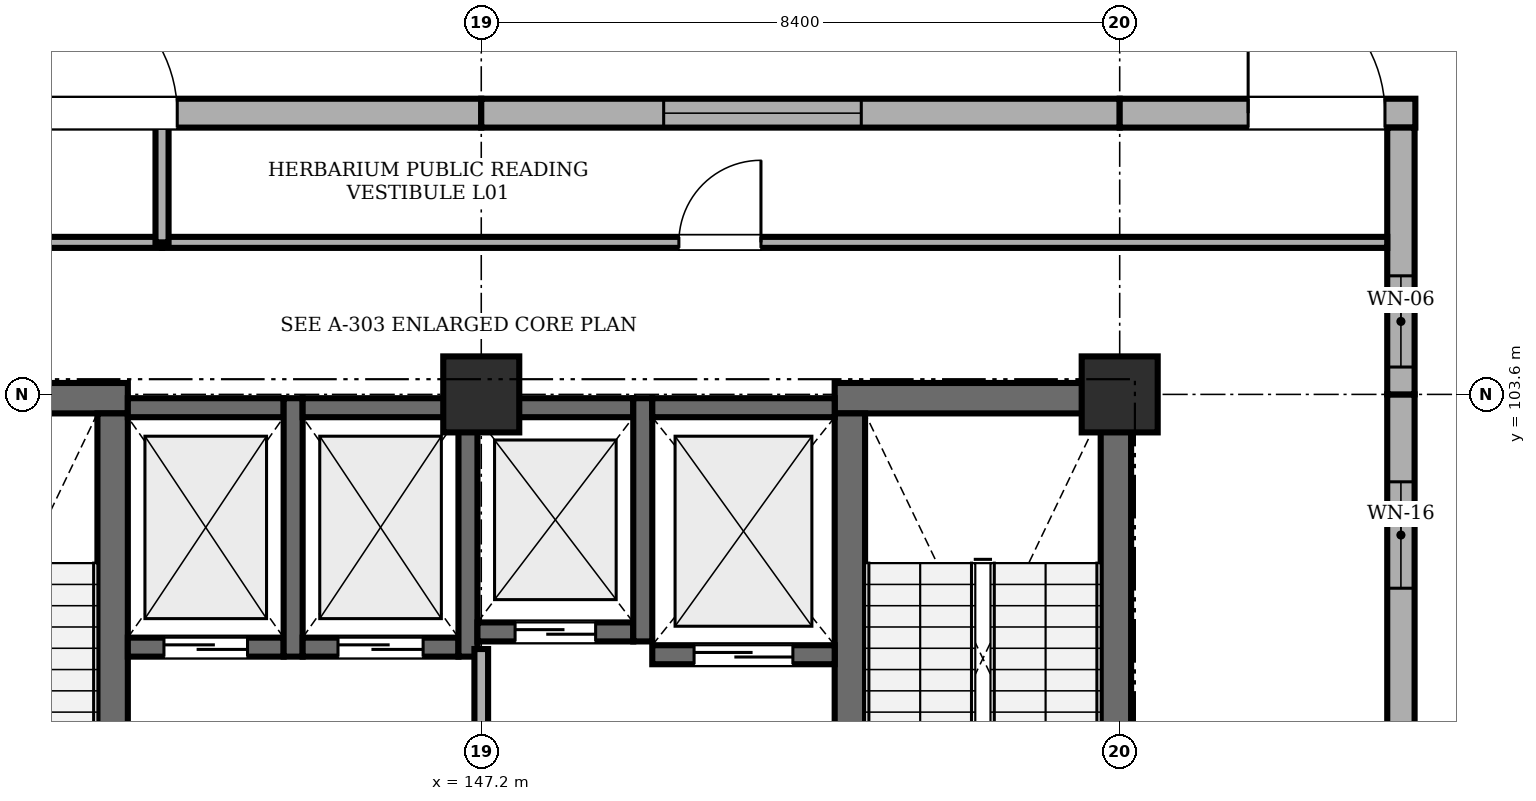
"""IFC4 building model, lengths in metres.
Left out: names, types, materials, properties, quantities, classifications, styles, units other than length and angle.
Written with IfcOpenShell. Run it as: python <this file> out.ifc"""

import sys

from ifc_helpers import new_model, si_unit, direction, frame, frame_2d, origin, origin_2d, place, context, subcontext, project, spatial, rectangle, extrude, element, fill, save


model = new_model("IFC4")
c1 = context("Model", 3, precision=1e-05, world=origin(), true_north=direction((0.0, 1.0)))
c2 = subcontext(c1, "Body", "Model", "MODEL_VIEW")
j1 = project(units=[si_unit("LENGTHUNIT", "METRE"), si_unit("PLANEANGLEUNIT", "RADIAN")], contexts=[c1])
p1 = place(None, origin())
s1 = spatial("IfcSite", under=j1, at=p1, CompositionType="ELEMENT")
p2 = place(p1, origin())
s2 = spatial("IfcBuilding", under=s1, at=p2, CompositionType="ELEMENT")
p3 = place(p2, origin())
s3 = spatial("IfcBuildingStorey", under=s2, at=p3, CompositionType="ELEMENT", Elevation=0.0)
for number, where, z_axis, x_axis in (
    (1, (147.2, 103.6, 0.0), (0.0, 0.0, 1.0), (1.0, 0.0, 0.0)),
    (2, (155.6, 103.6, 0.0), (0.0, 0.0, 1.0), (1.0, 0.0, 0.0)),
):
    element("IfcColumn", number, at=place(p3, frame(where, z_axis=z_axis, x_axis=x_axis)), inside=s3, PredefinedType="COLUMN", context=c2, shape_type="SweptSolid", body=[
        extrude(rectangle(XDim=1.0, YDim=1.0, at=origin_2d()), origin(), (0.0, 0.0, 1.0), 5.18),
    ])
p4 = place(p3, frame((138.65, 103.55, 0.0), z_axis=(0.0, 0.0, 1.0), x_axis=(1.0, 0.0, 0.0)))
e3 = element("IfcWall", 3, at=p4, inside=s3, PredefinedType="SHEAR", context=c2, shape_type="SweptSolid", body=[
    extrude(rectangle(XDim=3.9, YDim=0.4, at=frame_2d((1.95, 0.0))), origin(), (0.0, 0.0, 1.0), 5.18),
])
p5 = place(p3, frame((142.35, 95.45, 0.0), z_axis=(0.0, 0.0, 1.0), x_axis=(0.0, 1.0, 0.0)))
e4 = element("IfcWall", 4, at=p5, inside=s3, PredefinedType="SHEAR", context=c2, shape_type="SweptSolid", body=[
    extrude(rectangle(XDim=7.9, YDim=0.4, at=frame_2d((3.95, 0.0))), origin(), (0.0, 0.0, 1.0), 5.18),
])
p6 = place(p5, frame((0.22, 0.0, 0.0)))
e5 = element("IfcOpeningElement", 5, at=p6, cuts=e4, PredefinedType="OPENING", context=c2, shape_type="SweptSolid", body=[
    extrude(rectangle(XDim=1.15, YDim=2.15, at=frame_2d((0.575, 1.075))), frame((0.0, 0.21, 0.0), z_axis=(0.0, -1.0, 0.0), x_axis=(1.0, 0.0, 0.0)), (0.0, 0.0, 1.0), 0.42),
])
p7 = place(p3, frame((151.85, 103.55, 0.0), z_axis=(0.0, 0.0, 1.0), x_axis=(1.0, 0.0, 0.0)))
e6 = element("IfcWall", 6, at=p7, inside=s3, PredefinedType="SHEAR", context=c2, shape_type="SweptSolid", body=[
    extrude(rectangle(XDim=3.9, YDim=0.4, at=frame_2d((1.95, 0.0))), origin(), (0.0, 0.0, 1.0), 5.18),
])
p8 = place(p3, frame((152.05, 95.45, 0.0), z_axis=(0.0, 0.0, 1.0), x_axis=(0.0, 1.0, 0.0)))
e7 = element("IfcWall", 7, at=p8, inside=s3, PredefinedType="SHEAR", context=c2, shape_type="SweptSolid", body=[
    extrude(rectangle(XDim=7.9, YDim=0.4, at=frame_2d((3.95, 0.0))), origin(), (0.0, 0.0, 1.0), 5.18),
])
p9 = place(p8, frame((0.35, 0.0, 0.0)))
e8 = element("IfcOpeningElement", 8, at=p9, cuts=e7, PredefinedType="OPENING", context=c2, shape_type="SweptSolid", body=[
    extrude(rectangle(XDim=1.15, YDim=2.15, at=frame_2d((0.575, 1.075))), frame((0.0, 0.21, 0.0), z_axis=(0.0, -1.0, 0.0), x_axis=(1.0, 0.0, 0.0)), (0.0, 0.0, 1.0), 0.42),
])
p10 = place(p3, frame((155.55, 95.45, 0.0), z_axis=(0.0, 0.0, 1.0), x_axis=(0.0, 1.0, 0.0)))
e9 = element("IfcWall", 9, at=p10, inside=s3, PredefinedType="SHEAR", context=c2, shape_type="SweptSolid", body=[
    extrude(rectangle(XDim=7.9, YDim=0.4, at=frame_2d((3.95, 0.0))), origin(), (0.0, 0.0, 1.0), 5.18),
])
p11 = place(p3, frame((142.55, 100.275, 0.0), z_axis=(0.0, 0.0, 1.0), x_axis=(1.0, 0.0, 0.0)))
e10 = element("IfcWall", 10, at=p11, inside=s3, PredefinedType="SHEAR", context=c2, shape_type="SweptSolid", body=[
    extrude(rectangle(XDim=2.05, YDim=0.25, at=frame_2d((1.025, 0.0))), origin(), (0.0, 0.0, 1.0), 5.18),
])
p12 = place(p11, frame((0.475, 0.0, 0.0)))
e11 = element("IfcOpeningElement", 11, at=p12, cuts=e10, PredefinedType="OPENING", context=c2, shape_type="SweptSolid", body=[
    extrude(rectangle(XDim=1.1, YDim=2.15, at=frame_2d((0.55, 1.075))), frame((0.0, 0.135, 0.0), z_axis=(0.0, -1.0, 0.0), x_axis=(1.0, 0.0, 0.0)), (0.0, 0.0, 1.0), 0.27),
])
p13 = place(p3, frame((142.55, 103.425, 0.0), z_axis=(0.0, 0.0, 1.0), x_axis=(1.0, 0.0, 0.0)))
e12 = element("IfcWall", 12, at=p13, inside=s3, PredefinedType="SHEAR", context=c2, shape_type="SweptSolid", body=[
    extrude(rectangle(XDim=2.05, YDim=0.25, at=frame_2d((1.025, 0.0))), origin(), (0.0, 0.0, 1.0), 5.18),
])
p14 = place(p3, frame((144.725, 100.15, 0.0), z_axis=(0.0, 0.0, 1.0), x_axis=(0.0, 1.0, 0.0)))
e13 = element("IfcWall", 13, at=p14, inside=s3, PredefinedType="SHEAR", context=c2, shape_type="SweptSolid", body=[
    extrude(rectangle(XDim=3.4, YDim=0.25, at=frame_2d((1.7, 0.0))), origin(), (0.0, 0.0, 1.0), 5.18),
])
p15 = place(p3, frame((144.85, 100.275, 0.0), z_axis=(0.0, 0.0, 1.0), x_axis=(1.0, 0.0, 0.0)))
e14 = element("IfcWall", 14, at=p15, inside=s3, PredefinedType="SHEAR", context=c2, shape_type="SweptSolid", body=[
    extrude(rectangle(XDim=2.05, YDim=0.25, at=frame_2d((1.025, 0.0))), origin(), (0.0, 0.0, 1.0), 5.18),
])
p16 = place(p15, frame((0.465, 0.0, 0.0)))
e15 = element("IfcOpeningElement", 15, at=p16, cuts=e14, PredefinedType="OPENING", context=c2, shape_type="SweptSolid", body=[
    extrude(rectangle(XDim=1.12, YDim=2.15, at=frame_2d((0.56, 1.075))), frame((0.0, 0.135, 0.0), z_axis=(0.0, -1.0, 0.0), x_axis=(1.0, 0.0, 0.0)), (0.0, 0.0, 1.0), 0.27),
])
p17 = place(p3, frame((144.85, 103.425, 0.0), z_axis=(0.0, 0.0, 1.0), x_axis=(1.0, 0.0, 0.0)))
e16 = element("IfcWall", 16, at=p17, inside=s3, PredefinedType="SHEAR", context=c2, shape_type="SweptSolid", body=[
    extrude(rectangle(XDim=2.05, YDim=0.25, at=frame_2d((1.025, 0.0))), origin(), (0.0, 0.0, 1.0), 5.18),
])
p18 = place(p3, frame((147.025, 100.15, 0.0), z_axis=(0.0, 0.0, 1.0), x_axis=(0.0, 1.0, 0.0)))
e17 = element("IfcWall", 17, at=p18, inside=s3, PredefinedType="SHEAR", context=c2, shape_type="SweptSolid", body=[
    extrude(rectangle(XDim=3.4, YDim=0.25, at=frame_2d((1.7, 0.0))), origin(), (0.0, 0.0, 1.0), 5.18),
])
p19 = place(p3, frame((147.15, 100.475, 0.0), z_axis=(0.0, 0.0, 1.0), x_axis=(1.0, 0.0, 0.0)))
e18 = element("IfcWall", 18, at=p19, inside=s3, PredefinedType="SHEAR", context=c2, shape_type="SweptSolid", body=[
    extrude(rectangle(XDim=2.05, YDim=0.25, at=frame_2d((1.025, 0.0))), origin(), (0.0, 0.0, 1.0), 5.18),
])
p20 = place(p19, frame((0.495, 0.0, 0.0)))
e19 = element("IfcOpeningElement", 19, at=p20, cuts=e18, PredefinedType="OPENING", context=c2, shape_type="SweptSolid", body=[
    extrude(rectangle(XDim=1.06, YDim=2.15, at=frame_2d((0.53, 1.075))), frame((0.0, 0.135, 0.0), z_axis=(0.0, -1.0, 0.0), x_axis=(1.0, 0.0, 0.0)), (0.0, 0.0, 1.0), 0.27),
])
p21 = place(p3, frame((147.15, 103.425, 0.0), z_axis=(0.0, 0.0, 1.0), x_axis=(1.0, 0.0, 0.0)))
e20 = element("IfcWall", 20, at=p21, inside=s3, PredefinedType="SHEAR", context=c2, shape_type="SweptSolid", body=[
    extrude(rectangle(XDim=2.05, YDim=0.25, at=frame_2d((1.025, 0.0))), origin(), (0.0, 0.0, 1.0), 5.18),
])
p22 = place(p3, frame((149.325, 100.35, 0.0), z_axis=(0.0, 0.0, 1.0), x_axis=(0.0, 1.0, 0.0)))
e21 = element("IfcWall", 21, at=p22, inside=s3, PredefinedType="SHEAR", context=c2, shape_type="SweptSolid", body=[
    extrude(rectangle(XDim=3.2, YDim=0.25, at=frame_2d((1.6, 0.0))), origin(), (0.0, 0.0, 1.0), 5.18),
])
p23 = place(p3, frame((149.45, 100.175, 0.0), z_axis=(0.0, 0.0, 1.0), x_axis=(1.0, 0.0, 0.0)))
e22 = element("IfcWall", 22, at=p23, inside=s3, PredefinedType="SHEAR", context=c2, shape_type="SweptSolid", body=[
    extrude(rectangle(XDim=2.4, YDim=0.25, at=frame_2d((1.2, 0.0))), origin(), (0.0, 0.0, 1.0), 5.18),
])
p24 = place(p23, frame((0.55, 0.0, 0.0)))
e23 = element("IfcOpeningElement", 23, at=p24, cuts=e22, PredefinedType="OPENING", context=c2, shape_type="SweptSolid", body=[
    extrude(rectangle(XDim=1.3, YDim=2.25, at=frame_2d((0.65, 1.125))), frame((0.0, 0.135, 0.0), z_axis=(0.0, -1.0, 0.0), x_axis=(1.0, 0.0, 0.0)), (0.0, 0.0, 1.0), 0.27),
])
p25 = place(p3, frame((149.45, 103.425, 0.0), z_axis=(0.0, 0.0, 1.0), x_axis=(1.0, 0.0, 0.0)))
e24 = element("IfcWall", 24, at=p25, inside=s3, PredefinedType="SHEAR", context=c2, shape_type="SweptSolid", body=[
    extrude(rectangle(XDim=2.4, YDim=0.25, at=frame_2d((1.2, 0.0))), origin(), (0.0, 0.0, 1.0), 5.18),
])
p26 = place(p3, frame((138.8, 107.3, 0.0), z_axis=(0.0, 0.0, 1.0), x_axis=(1.0, 0.0, 0.0)))
e25 = element("IfcWall", 25, at=p26, inside=s3, PredefinedType="SOLIDWALL", context=c2, shape_type="SweptSolid", body=[
    extrude(rectangle(XDim=8.4, YDim=0.38, at=frame_2d((4.2, 0.0))), origin(), (0.0, 0.0, 1.0), 5.18),
])
p27 = place(p26, frame((2.6, 0.0, 0.0)))
e26 = element("IfcOpeningElement", 26, at=p27, cuts=e25, PredefinedType="OPENING", context=c2, shape_type="SweptSolid", body=[
    extrude(rectangle(XDim=1.8, YDim=2.3, at=frame_2d((0.9, 1.15))), frame((0.0, 0.2, 0.0), z_axis=(0.0, -1.0, 0.0), x_axis=(1.0, 0.0, 0.0)), (0.0, 0.0, 1.0), 0.4),
])
p28 = place(p3, frame((147.2, 107.3, 0.0), z_axis=(0.0, 0.0, 1.0), x_axis=(1.0, 0.0, 0.0)))
e27 = element("IfcWall", 27, at=p28, inside=s3, PredefinedType="SOLIDWALL", context=c2, shape_type="SweptSolid", body=[
    extrude(rectangle(XDim=8.4, YDim=0.38, at=frame_2d((4.2, 0.0))), origin(), (0.0, 0.0, 1.0), 5.18),
])
p29 = place(p28, frame((2.4, 0.0, 0.85)))
e28 = element("IfcOpeningElement", 28, at=p29, cuts=e27, PredefinedType="OPENING", context=c2, shape_type="SweptSolid", body=[
    extrude(rectangle(XDim=2.6, YDim=2.4, at=frame_2d((1.3, 1.2))), frame((0.0, 0.2, 0.0), z_axis=(0.0, -1.0, 0.0), x_axis=(1.0, 0.0, 0.0)), (0.0, 0.0, 1.0), 0.4),
])
p30 = place(p3, frame((155.6, 107.3, 0.0), z_axis=(0.0, 0.0, 1.0), x_axis=(1.0, 0.0, 0.0)))
e29 = element("IfcWall", 29, at=p30, inside=s3, PredefinedType="SOLIDWALL", context=c2, shape_type="SweptSolid", body=[
    extrude(rectangle(XDim=3.89, YDim=0.38, at=frame_2d((1.945, 0.0))), origin(), (0.0, 0.0, 1.0), 5.18),
])
p31 = place(p30, frame((1.69, 0.0, 0.0)))
e30 = element("IfcOpeningElement", 30, at=p31, cuts=e29, PredefinedType="OPENING", context=c2, shape_type="SweptSolid", body=[
    extrude(rectangle(XDim=1.8, YDim=2.3, at=frame_2d((0.9, 1.15))), frame((0.0, 0.2, 0.0), z_axis=(0.0, -1.0, 0.0), x_axis=(1.0, 0.0, 0.0)), (0.0, 0.0, 1.0), 0.4),
])
p32 = place(p3, frame((159.3, 103.6, 0.0), z_axis=(0.0, 0.0, 1.0), x_axis=(0.0, -1.0, 0.0)))
e31 = element("IfcWall", 31, at=p32, inside=s3, PredefinedType="STANDARD", context=c2, shape_type="SweptSolid", body=[
    extrude(rectangle(XDim=8.4, YDim=0.36, at=frame_2d((4.2, 0.0))), origin(), (0.0, 0.0, 1.0), 4.78),
])
p33 = place(p32, frame((1.15, 0.0, 1.1)))
e32 = element("IfcOpeningElement", 32, at=p33, cuts=e31, PredefinedType="OPENING", context=c2, shape_type="SweptSolid", body=[
    extrude(rectangle(XDim=1.4, YDim=1.4, at=frame_2d((0.7, 0.7))), frame((0.0, 0.19, 0.0), z_axis=(0.0, -1.0, 0.0), x_axis=(1.0, 0.0, 0.0)), (0.0, 0.0, 1.0), 0.38),
])
p34 = place(p3, frame((159.3, 107.11, 0.0), z_axis=(0.0, 0.0, 1.0), x_axis=(0.0, -1.0, 0.0)))
e33 = element("IfcWall", 33, at=p34, inside=s3, PredefinedType="STANDARD", context=c2, shape_type="SweptSolid", body=[
    extrude(rectangle(XDim=3.51, YDim=0.36, at=frame_2d((1.755, 0.0))), origin(), (0.0, 0.0, 1.0), 4.78),
])
p35 = place(p34, frame((1.95, 0.0, 1.1)))
e34 = element("IfcOpeningElement", 34, at=p35, cuts=e33, PredefinedType="OPENING", context=c2, shape_type="SweptSolid", body=[
    extrude(rectangle(XDim=1.2, YDim=1.8, at=frame_2d((0.6, 0.9))), frame((0.0, 0.19, 0.0), z_axis=(0.0, -1.0, 0.0), x_axis=(1.0, 0.0, 0.0)), (0.0, 0.0, 1.0), 0.38),
])
p36 = place(p3, frame((147.2, 95.75, 0.0), z_axis=(0.0, 0.0, 1.0), x_axis=(0.0, 1.0, 0.0)))
e35 = element("IfcWall", 35, at=p36, inside=s3, PredefinedType="STANDARD", context=c2, shape_type="SweptSolid", body=[
    extrude(rectangle(XDim=4.5, YDim=0.18, at=frame_2d((2.25, 0.0))), origin(), (0.0, 0.0, 1.0), 4.43),
])
p37 = place(p3, frame((122.15, 105.6, 0.0), z_axis=(0.0, 0.0, 1.0), x_axis=(1.0, 0.0, 0.0)))
e36 = element("IfcWall", 36, at=p37, inside=s3, PredefinedType="PARTITIONING", context=c2, shape_type="SweptSolid", body=[
    extrude(rectangle(XDim=20.85, YDim=0.145, at=frame_2d((10.425, 0.0))), origin(), (0.0, 0.0, 1.0), 5.18),
])
p38 = place(p37, frame((3.75, 0.0, 0.0)))
e37 = element("IfcOpeningElement", 37, at=p38, cuts=e36, PredefinedType="OPENING", context=c2, shape_type="SweptSolid", body=[
    extrude(rectangle(XDim=1.85, YDim=2.25, at=frame_2d((0.925, 1.125))), frame((0.0, 0.083, 0.0), z_axis=(0.0, -1.0, 0.0), x_axis=(1.0, 0.0, 0.0)), (0.0, 0.0, 1.0), 0.165),
])
p39 = place(p3, frame((143.0, 105.6, 0.0), z_axis=(0.0, 0.0, 1.0), x_axis=(1.0, 0.0, 0.0)))
e38 = element("IfcWall", 38, at=p39, inside=s3, PredefinedType="PARTITIONING", context=c2, shape_type="SweptSolid", body=[
    extrude(rectangle(XDim=16.12, YDim=0.145, at=frame_2d((8.06, 0.0))), origin(), (0.0, 0.0, 1.0), 5.18),
])
p40 = place(p39, frame((6.8, 0.0, 0.0)))
e39 = element("IfcOpeningElement", 39, at=p40, cuts=e38, PredefinedType="OPENING", context=c2, shape_type="SweptSolid", body=[
    extrude(rectangle(XDim=1.08, YDim=2.15, at=frame_2d((0.54, 1.075))), frame((0.0, 0.083, 0.0), z_axis=(0.0, -1.0, 0.0), x_axis=(1.0, 0.0, 0.0)), (0.0, 0.0, 1.0), 0.165),
])
p41 = place(p3, frame((143.0, 105.6, 0.0), z_axis=(0.0, 0.0, 1.0), x_axis=(0.0, 1.0, 0.0)))
e40 = element("IfcWall", 40, at=p41, inside=s3, PredefinedType="PARTITIONING", context=c2, shape_type="SweptSolid", body=[
    extrude(rectangle(XDim=1.52, YDim=0.172, at=frame_2d((0.76, 0.0))), origin(), (0.0, 0.0, 1.0), 4.78),
])
p42 = place(p27, origin())
e41 = element("IfcDoor", 41, at=p42, inside=s3, OperationType="SINGLE_SWING_LEFT", PredefinedType="DOOR", context=c2, shape_type="SweptSolid", body=[
    extrude(rectangle(XDim=1.8, YDim=2.3, at=frame_2d((0.9, 1.15))), frame((0.0, 0.025, 0.0), z_axis=(0.0, -1.0, 0.0), x_axis=(1.0, 0.0, 0.0)), (0.0, 0.0, 1.0), 0.05),
])
fill(e26, e41)
p43 = place(p29, origin())
e42 = element("IfcWindow", 42, at=p43, inside=s3, PartitioningType="TRIPLE_PANEL_VERTICAL", PredefinedType="WINDOW", context=c2, shape_type="SweptSolid", body=[
    extrude(rectangle(XDim=2.6, YDim=2.4, at=frame_2d((1.3, 1.2))), frame((0.0, 0.03, 0.0), z_axis=(0.0, -1.0, 0.0), x_axis=(1.0, 0.0, 0.0)), (0.0, 0.0, 1.0), 0.06),
])
fill(e28, e42)
p44 = place(p31, origin())
e43 = element("IfcDoor", 43, at=p44, inside=s3, OperationType="SINGLE_SWING_LEFT", PredefinedType="DOOR", context=c2, shape_type="SweptSolid", body=[
    extrude(rectangle(XDim=1.8, YDim=2.3, at=frame_2d((0.9, 1.15))), frame((0.0, 0.025, 0.0), z_axis=(0.0, -1.0, 0.0), x_axis=(1.0, 0.0, 0.0)), (0.0, 0.0, 1.0), 0.05),
])
fill(e30, e43)
p45 = place(p33, origin())
e44 = element("IfcWindow", 44, at=p45, inside=s3, PartitioningType="SINGLE_PANEL", PredefinedType="WINDOW", context=c2, shape_type="SweptSolid", body=[
    extrude(rectangle(XDim=1.4, YDim=1.4, at=frame_2d((0.7, 0.7))), frame((0.0, 0.03, 0.0), z_axis=(0.0, -1.0, 0.0), x_axis=(1.0, 0.0, 0.0)), (0.0, 0.0, 1.0), 0.06),
])
fill(e32, e44)
p46 = place(p35, origin())
e45 = element("IfcWindow", 45, at=p46, inside=s3, PartitioningType="SINGLE_PANEL", PredefinedType="WINDOW", context=c2, shape_type="SweptSolid", body=[
    extrude(rectangle(XDim=1.2, YDim=1.8, at=frame_2d((0.6, 0.9))), frame((0.0, 0.03, 0.0), z_axis=(0.0, -1.0, 0.0), x_axis=(1.0, 0.0, 0.0)), (0.0, 0.0, 1.0), 0.06),
])
fill(e34, e45)
p47 = place(p40, origin())
e46 = element("IfcDoor", 46, at=p47, inside=s3, OperationType="SINGLE_SWING_RIGHT", PredefinedType="DOOR", context=c2, shape_type="SweptSolid", body=[
    extrude(rectangle(XDim=1.08, YDim=2.15, at=frame_2d((0.54, 1.075))), frame((0.0, 0.025, 0.0), z_axis=(0.0, -1.0, 0.0), x_axis=(1.0, 0.0, 0.0)), (0.0, 0.0, 1.0), 0.05),
])
fill(e39, e46)
p48 = place(p12, origin())
e47 = element("IfcDoor", 47, at=p48, inside=s3, OperationType="SLIDING_TO_LEFT", PredefinedType="DOOR", context=c2, shape_type="SweptSolid", body=[
    extrude(rectangle(XDim=1.1, YDim=2.15, at=frame_2d((0.55, 1.075))), frame((0.0, 0.025, 0.0), z_axis=(0.0, -1.0, 0.0), x_axis=(1.0, 0.0, 0.0)), (0.0, 0.0, 1.0), 0.05),
])
fill(e11, e47)
p49 = place(p16, origin())
e48 = element("IfcDoor", 48, at=p49, inside=s3, OperationType="SLIDING_TO_LEFT", PredefinedType="DOOR", context=c2, shape_type="SweptSolid", body=[
    extrude(rectangle(XDim=1.12, YDim=2.15, at=frame_2d((0.56, 1.075))), frame((0.0, 0.025, 0.0), z_axis=(0.0, -1.0, 0.0), x_axis=(1.0, 0.0, 0.0)), (0.0, 0.0, 1.0), 0.05),
])
fill(e15, e48)
p50 = place(p20, origin())
e49 = element("IfcDoor", 49, at=p50, inside=s3, OperationType="SLIDING_TO_LEFT", PredefinedType="DOOR", context=c2, shape_type="SweptSolid", body=[
    extrude(rectangle(XDim=1.06, YDim=2.15, at=frame_2d((0.53, 1.075))), frame((0.0, 0.025, 0.0), z_axis=(0.0, -1.0, 0.0), x_axis=(1.0, 0.0, 0.0)), (0.0, 0.0, 1.0), 0.05),
])
fill(e19, e49)
p51 = place(p24, origin())
e50 = element("IfcDoor", 50, at=p51, inside=s3, OperationType="SLIDING_TO_LEFT", PredefinedType="DOOR", context=c2, shape_type="SweptSolid", body=[
    extrude(rectangle(XDim=1.3, YDim=2.25, at=frame_2d((0.65, 1.125))), frame((0.0, 0.025, 0.0), z_axis=(0.0, -1.0, 0.0), x_axis=(1.0, 0.0, 0.0)), (0.0, 0.0, 1.0), 0.05),
])
fill(e23, e50)
save(model, sys.argv[1])
